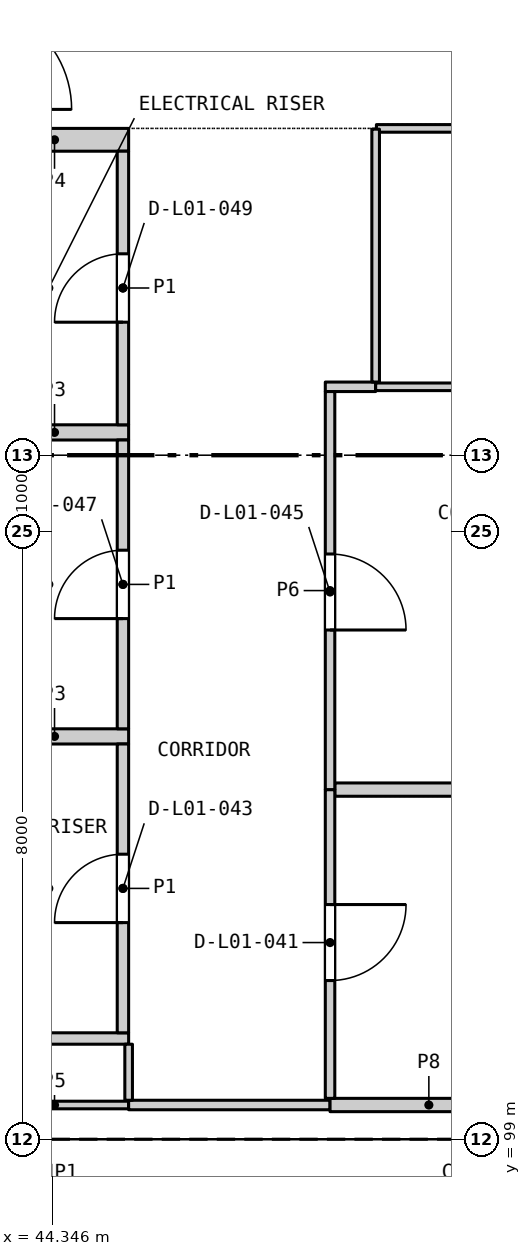
"""IFC4 building model, lengths in metres.
Left out: names, types, materials, properties, quantities, classifications, styles, units other than length and angle.
Written with IfcOpenShell. Run it as: python <this file> out.ifc"""

import sys

from ifc_helpers import new_model, si_unit, direction, frame, frame_2d, origin, place, context, subcontext, project, spatial, rectangle, extrude, element, fill, save


model = new_model("IFC4")
c1 = context("Model", 3, precision=1e-05, world=origin(), true_north=direction((0.0, 1.0)))
c2 = subcontext(c1, "Body", "Model", "MODEL_VIEW")
j1 = project(units=[si_unit("LENGTHUNIT", "METRE"), si_unit("PLANEANGLEUNIT", "RADIAN")], contexts=[c1])
p1 = place(None, origin())
s1 = spatial("IfcSite", under=j1, at=p1, CompositionType="ELEMENT")
p2 = place(p1, origin())
s2 = spatial("IfcBuilding", under=s1, at=p2, CompositionType="ELEMENT")
p3 = place(p2, frame((0.0, 0.0, 6.0)))
s3 = spatial("IfcBuildingStorey", under=s2, at=p3, CompositionType="ELEMENT", Elevation=6.0)
p4 = place(p3, frame((43.4, 100.325, 0.0), z_axis=(0.0, 0.0, 1.0), x_axis=(1.0, 0.0, 0.0)))
e1 = element("IfcWall", 1, at=p4, inside=s3, PredefinedType="PARTITIONING", context=c2, shape_type="SweptSolid", body=[
    extrude(rectangle(XDim=1.95, YDim=0.15, at=frame_2d((0.975, 0.0))), origin(), (0.0, 0.0, 1.0), 3.9),
])
for number, where, z_axis, x_axis in (
    (2, (43.4, 104.3, 0.0), (0.0, 0.0, 1.0), (1.0, 0.0, 0.0)),
    (3, (43.4, 108.3, 0.0), (0.0, 0.0, 1.0), (1.0, 0.0, 0.0)),
):
    element("IfcWall", number, at=place(p3, frame(where, z_axis=z_axis, x_axis=x_axis)), inside=s3, PredefinedType="PARTITIONING", context=c2, shape_type="SweptSolid", body=[
        extrude(rectangle(XDim=1.95, YDim=0.2, at=frame_2d((0.975, 0.0))), origin(), (0.0, 0.0, 1.0), 3.9),
    ])
p5 = place(p3, frame((43.4, 112.15, 0.0), z_axis=(0.0, 0.0, 1.0), x_axis=(1.0, 0.0, 0.0)))
e4 = element("IfcWall", 4, at=p5, inside=s3, PredefinedType="PARTITIONING", context=c2, shape_type="SweptSolid", body=[
    extrude(rectangle(XDim=1.95, YDim=0.3, at=frame_2d((0.975, 0.0))), origin(), (0.0, 0.0, 1.0), 3.9),
])
p6 = place(p3, frame((45.275, 100.4, 0.0), z_axis=(0.0, 0.0, 1.0), x_axis=(0.0, 1.0, 0.0)))
e5 = element("IfcWall", 5, at=p6, inside=s3, PredefinedType="PARTITIONING", context=c2, shape_type="SweptSolid", body=[
    extrude(rectangle(XDim=3.8, YDim=0.15, at=frame_2d((1.9, 0.0))), origin(), (0.0, 0.0, 1.0), 3.9),
])
p7 = place(p6, frame((1.45, 0.0, 0.0)))
e6 = element("IfcOpeningElement", 6, at=p7, cuts=e5, PredefinedType="OPENING", context=c2, shape_type="SweptSolid", body=[
    extrude(rectangle(XDim=0.9, YDim=2.1, at=frame_2d((0.45, 1.05))), frame((0.0, 0.085, 0.0), z_axis=(0.0, -1.0, 0.0), x_axis=(1.0, 0.0, 0.0)), (0.0, 0.0, 1.0), 0.17),
])
p8 = place(p3, frame((45.275, 104.4, 0.0), z_axis=(0.0, 0.0, 1.0), x_axis=(0.0, 1.0, 0.0)))
e7 = element("IfcWall", 7, at=p8, inside=s3, PredefinedType="PARTITIONING", context=c2, shape_type="SweptSolid", body=[
    extrude(rectangle(XDim=3.8, YDim=0.15, at=frame_2d((1.9, 0.0))), origin(), (0.0, 0.0, 1.0), 3.9),
])
p9 = place(p8, frame((1.45, 0.0, 0.0)))
e8 = element("IfcOpeningElement", 8, at=p9, cuts=e7, PredefinedType="OPENING", context=c2, shape_type="SweptSolid", body=[
    extrude(rectangle(XDim=0.9, YDim=2.1, at=frame_2d((0.45, 1.05))), frame((0.0, 0.085, 0.0), z_axis=(0.0, -1.0, 0.0), x_axis=(1.0, 0.0, 0.0)), (0.0, 0.0, 1.0), 0.17),
])
p10 = place(p3, frame((45.275, 108.4, 0.0), z_axis=(0.0, 0.0, 1.0), x_axis=(0.0, 1.0, 0.0)))
e9 = element("IfcWall", 9, at=p10, inside=s3, PredefinedType="PARTITIONING", context=c2, shape_type="SweptSolid", body=[
    extrude(rectangle(XDim=3.6, YDim=0.15, at=frame_2d((1.8, 0.0))), origin(), (0.0, 0.0, 1.0), 3.9),
])
p11 = place(p10, frame((1.35, 0.0, 0.0)))
e10 = element("IfcOpeningElement", 10, at=p11, cuts=e9, PredefinedType="OPENING", context=c2, shape_type="SweptSolid", body=[
    extrude(rectangle(XDim=0.9, YDim=2.1, at=frame_2d((0.45, 1.05))), frame((0.0, 0.085, 0.0), z_axis=(0.0, -1.0, 0.0), x_axis=(1.0, 0.0, 0.0)), (0.0, 0.0, 1.0), 0.17),
])
p12 = place(p3, frame((43.4, 99.45, 0.0), z_axis=(0.0, 0.0, 1.0), x_axis=(1.0, 0.0, 0.0)))
e11 = element("IfcWall", 11, at=p12, inside=s3, PredefinedType="PARTITIONING", context=c2, shape_type="SweptSolid", body=[
    extrude(rectangle(XDim=1.95, YDim=0.1, at=frame_2d((0.975, 0.0))), origin(), (0.0, 0.0, 1.0), 4.0),
])
p13 = place(p3, frame((45.35, 99.45, 0.0), z_axis=(0.0, 0.0, 1.0), x_axis=(1.0, 0.0, 0.0)))
e12 = element("IfcWall", 12, at=p13, inside=s3, PredefinedType="PARTITIONING", context=c2, shape_type="SweptSolid", body=[
    extrude(rectangle(XDim=2.65, YDim=0.125, at=frame_2d((1.325, 0.0))), origin(), (0.0, 0.0, 1.0), 3.9),
])
p14 = place(p3, frame((48.0, 99.45, 0.0), z_axis=(0.0, 0.0, 1.0), x_axis=(1.0, 0.0, 0.0)))
e13 = element("IfcWall", 13, at=p14, inside=s3, PredefinedType="PARTITIONING", context=c2, shape_type="SweptSolid", body=[
    extrude(rectangle(XDim=2.6, YDim=0.175, at=frame_2d((1.3, 0.0))), origin(), (0.0, 0.0, 1.0), 3.9),
])
p15 = place(p3, frame((48.062, 103.6, 0.0), z_axis=(0.0, 0.0, 1.0), x_axis=(1.0, 0.0, 0.0)))
e14 = element("IfcWall", 14, at=p15, inside=s3, PredefinedType="PARTITIONING", context=c2, shape_type="SweptSolid", body=[
    extrude(rectangle(XDim=9.488, YDim=0.175, at=frame_2d((4.744, 0.0))), origin(), (0.0, 0.0, 1.0), 3.9),
])
p16 = place(p3, frame((47.938, 108.9, 0.0), z_axis=(0.0, 0.0, 1.0), x_axis=(1.0, 0.0, 0.0)))
e15 = element("IfcWall", 15, at=p16, inside=s3, PredefinedType="PARTITIONING", context=c2, shape_type="SweptSolid", body=[
    extrude(rectangle(XDim=0.663, YDim=0.125, at=frame_2d((0.331, 0.0))), origin(), (0.0, 0.0, 1.0), 3.9),
])
p17 = place(p3, frame((48.6, 108.9, 0.0), z_axis=(0.0, 0.0, 1.0), x_axis=(1.0, 0.0, 0.0)))
e16 = element("IfcWall", 16, at=p17, inside=s3, PredefinedType="PARTITIONING", context=c2, shape_type="SweptSolid", body=[
    extrude(rectangle(XDim=8.95, YDim=0.1, at=frame_2d((4.475, 0.0))), origin(), (0.0, 0.0, 1.0), 3.9),
])
p18 = place(p3, frame((48.61, 112.3, 0.0), z_axis=(0.0, 0.0, 1.0), x_axis=(1.0, 0.0, 0.0)))
e17 = element("IfcWall", 17, at=p18, inside=s3, PredefinedType="PARTITIONING", context=c2, shape_type="SweptSolid", body=[
    extrude(rectangle(XDim=8.94, YDim=0.1, at=frame_2d((4.47, 0.0))), origin(), (0.0, 0.0, 1.0), 3.9),
])
p19 = place(p3, frame((45.35, 99.512, 0.0), z_axis=(0.0, 0.0, 1.0), x_axis=(0.0, 1.0, 0.0)))
e18 = element("IfcWall", 18, at=p19, inside=s3, PredefinedType="PARTITIONING", context=c2, shape_type="SweptSolid", body=[
    extrude(rectangle(XDim=0.738, YDim=0.1, at=frame_2d((0.369, 0.0))), origin(), (0.0, 0.0, 1.0), 3.9),
])
p20 = place(p3, frame((48.0, 99.538, 0.0), z_axis=(0.0, 0.0, 1.0), x_axis=(0.0, 1.0, 0.0)))
e19 = element("IfcWall", 19, at=p20, inside=s3, PredefinedType="PARTITIONING", context=c2, shape_type="SweptSolid", body=[
    extrude(rectangle(XDim=4.062, YDim=0.125, at=frame_2d((2.031, 0.0))), origin(), (0.0, 0.0, 1.0), 3.9),
])
p21 = place(p20, frame((1.55, 0.0, 0.0)))
e20 = element("IfcOpeningElement", 20, at=p21, cuts=e19, PredefinedType="OPENING", context=c2, shape_type="SweptSolid", body=[
    extrude(rectangle(XDim=1.0, YDim=2.1, at=frame_2d((0.5, 1.05))), frame((0.0, 0.073, 0.0), z_axis=(0.0, -1.0, 0.0), x_axis=(1.0, 0.0, 0.0)), (0.0, 0.0, 1.0), 0.145),
])
p22 = place(p3, frame((48.0, 103.6, 0.0), z_axis=(0.0, 0.0, 1.0), x_axis=(0.0, 1.0, 0.0)))
e21 = element("IfcWall", 21, at=p22, inside=s3, PredefinedType="PARTITIONING", context=c2, shape_type="SweptSolid", body=[
    extrude(rectangle(XDim=5.237, YDim=0.125, at=frame_2d((2.619, 0.0))), origin(), (0.0, 0.0, 1.0), 3.9),
])
p23 = place(p22, frame((2.1, 0.0, 0.0)))
e22 = element("IfcOpeningElement", 22, at=p23, cuts=e21, PredefinedType="OPENING", context=c2, shape_type="SweptSolid", body=[
    extrude(rectangle(XDim=1.0, YDim=2.1, at=frame_2d((0.5, 1.05))), frame((0.0, 0.073, 0.0), z_axis=(0.0, -1.0, 0.0), x_axis=(1.0, 0.0, 0.0)), (0.0, 0.0, 1.0), 0.145),
])
p24 = place(p3, frame((48.6, 108.962, 0.0), z_axis=(0.0, 0.0, 1.0), x_axis=(0.0, 1.0, 0.0)))
e23 = element("IfcWall", 23, at=p24, inside=s3, PredefinedType="PARTITIONING", context=c2, shape_type="SweptSolid", body=[
    extrude(rectangle(XDim=3.328, YDim=0.1, at=frame_2d((1.664, 0.0))), origin(), (0.0, 0.0, 1.0), 3.9),
])
p25 = place(p21, frame((1.0, 0.0, 0.0), z_axis=(0.0, 0.0, 1.0), x_axis=(-1.0, 0.0, 0.0)))
e24 = element("IfcDoor", 24, at=p25, inside=s3, OperationType="SINGLE_SWING_LEFT", PredefinedType="DOOR", context=c2, shape_type="SweptSolid", body=[
    extrude(rectangle(XDim=1.0, YDim=2.1, at=frame_2d((0.5, 1.05))), frame((0.0, 0.025, 0.0), z_axis=(0.0, -1.0, 0.0), x_axis=(1.0, 0.0, 0.0)), (0.0, 0.0, 1.0), 0.05),
])
fill(e20, e24)
p26 = place(p7, origin())
e25 = element("IfcDoor", 25, at=p26, inside=s3, OperationType="SINGLE_SWING_LEFT", PredefinedType="DOOR", context=c2, shape_type="SweptSolid", body=[
    extrude(rectangle(XDim=0.9, YDim=2.1, at=frame_2d((0.45, 1.05))), frame((0.0, 0.025, 0.0), z_axis=(0.0, -1.0, 0.0), x_axis=(1.0, 0.0, 0.0)), (0.0, 0.0, 1.0), 0.05),
])
fill(e6, e25)
p27 = place(p23, frame((1.0, 0.0, 0.0), z_axis=(0.0, 0.0, 1.0), x_axis=(-1.0, 0.0, 0.0)))
e26 = element("IfcDoor", 26, at=p27, inside=s3, OperationType="SINGLE_SWING_RIGHT", PredefinedType="DOOR", context=c2, shape_type="SweptSolid", body=[
    extrude(rectangle(XDim=1.0, YDim=2.1, at=frame_2d((0.5, 1.05))), frame((0.0, 0.025, 0.0), z_axis=(0.0, -1.0, 0.0), x_axis=(1.0, 0.0, 0.0)), (0.0, 0.0, 1.0), 0.05),
])
fill(e22, e26)
p28 = place(p9, origin())
e27 = element("IfcDoor", 27, at=p28, inside=s3, OperationType="SINGLE_SWING_LEFT", PredefinedType="DOOR", context=c2, shape_type="SweptSolid", body=[
    extrude(rectangle(XDim=0.9, YDim=2.1, at=frame_2d((0.45, 1.05))), frame((0.0, 0.025, 0.0), z_axis=(0.0, -1.0, 0.0), x_axis=(1.0, 0.0, 0.0)), (0.0, 0.0, 1.0), 0.05),
])
fill(e8, e27)
p29 = place(p11, origin())
e28 = element("IfcDoor", 28, at=p29, inside=s3, OperationType="SINGLE_SWING_LEFT", PredefinedType="DOOR", context=c2, shape_type="SweptSolid", body=[
    extrude(rectangle(XDim=0.9, YDim=2.1, at=frame_2d((0.45, 1.05))), frame((0.0, 0.025, 0.0), z_axis=(0.0, -1.0, 0.0), x_axis=(1.0, 0.0, 0.0)), (0.0, 0.0, 1.0), 0.05),
])
fill(e10, e28)
save(model, sys.argv[1])
